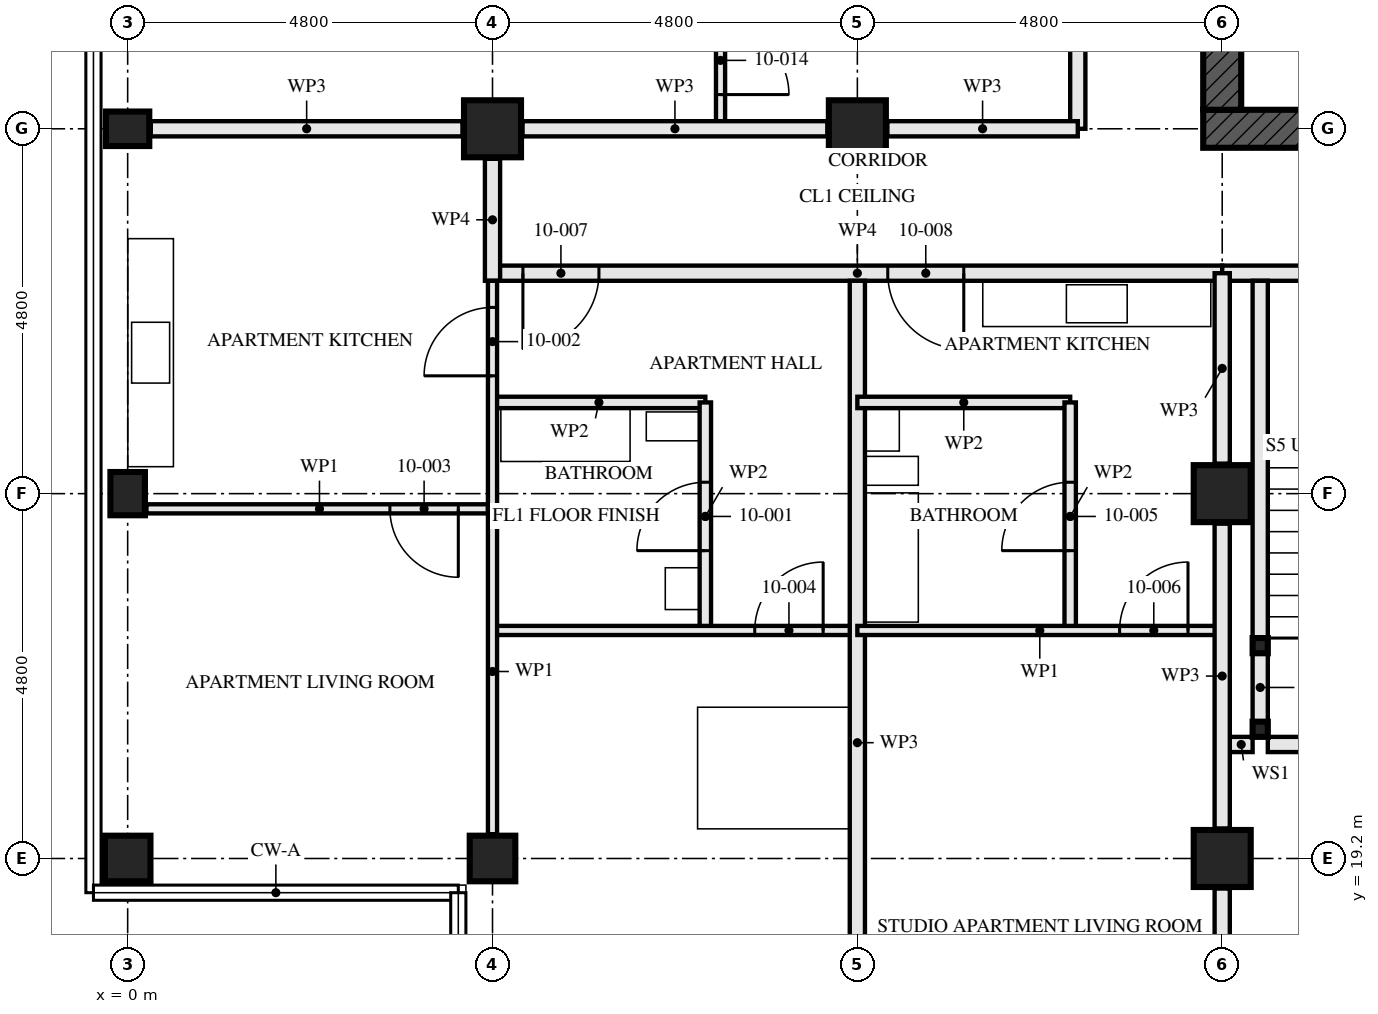
"""IFC4 building model, lengths in metres.
Left out: names, types, materials, properties, quantities, classifications, styles, units other than length and angle.
Written with IfcOpenShell. Run it as: python <this file> out.ifc"""

import sys

from ifc_helpers import new_model, si_unit, direction, frame, frame_2d, origin, origin_2d, place, context, subcontext, project, spatial, rectangle, hollow_rectangle, i_section, extrude, element, fill, save


model = new_model("IFC4")
c1 = context("Model", 3, precision=1e-05, world=origin(), true_north=direction((0.0, 1.0)))
c2 = subcontext(c1, "Body", "Model", "MODEL_VIEW")
j1 = project(units=[si_unit("LENGTHUNIT", "METRE"), si_unit("PLANEANGLEUNIT", "RADIAN")], contexts=[c1])
p1 = place(None, origin())
s1 = spatial("IfcSite", under=j1, at=p1, CompositionType="ELEMENT")
p2 = place(p1, origin())
s2 = spatial("IfcBuilding", under=s1, at=p2, CompositionType="ELEMENT")
p3 = place(p2, frame((0.0, 0.0, 41.0)))
s3 = spatial("IfcBuildingStorey", under=s2, at=p3, CompositionType="ELEMENT", Elevation=41.0)
p4 = place(p3, frame((0.0, 19.2, 0.0), z_axis=(0.0, 0.0, 1.0), x_axis=(0.0, 1.0, 0.0)))
e1 = element("IfcColumn", 1, at=p4, inside=s3, PredefinedType="COLUMN", context=c2, shape_type="SweptSolid", body=[
    extrude(hollow_rectangle(XDim=0.6, YDim=0.6, WallThickness=0.05, at=origin_2d()), origin(), (0.0, 0.0, 1.0), 3.5),
])
for number, where, z_axis, x_axis in (
    (2, (0.0, 24.0, 0.0), (0.0, 0.0, 1.0), (1.0, 0.0, 0.0)),
    (3, (0.0, 28.8, 0.0), (0.0, 0.0, 1.0), (0.0, 1.0, 0.0)),
):
    element("IfcColumn", number, at=place(p3, frame(where, z_axis=z_axis, x_axis=x_axis)), inside=s3, PredefinedType="COLUMN", context=c2, shape_type="SweptSolid", body=[
        extrude(i_section(OverallWidth=0.454, OverallDepth=0.569, WebThickness=0.078, FlangeThickness=0.125, FilletRadius=0.015, at=origin_2d()), origin(), (0.0, 0.0, 1.0), 3.5),
    ])
p5 = place(p3, frame((4.8, 19.2, 0.0), z_axis=(0.0, 0.0, 1.0), x_axis=(0.0, 1.0, 0.0)))
e4 = element("IfcColumn", 4, at=p5, inside=s3, PredefinedType="COLUMN", context=c2, shape_type="SweptSolid", body=[
    extrude(hollow_rectangle(XDim=0.6, YDim=0.6, WallThickness=0.05, at=origin_2d()), origin(), (0.0, 0.0, 1.0), 3.5),
])
for number, where, z_axis, x_axis in (
    (5, (4.8, 28.8, 0.0), (0.0, 0.0, 1.0), (0.0, 1.0, 0.0)),
    (6, (9.6, 28.8, 0.0), (0.0, 0.0, 1.0), (0.0, 1.0, 0.0)),
    (7, (14.4, 19.2, 0.0), (0.0, 0.0, 1.0), (1.0, 0.0, 0.0)),
    (8, (14.4, 24.0, 0.0), (0.0, 0.0, 1.0), (1.0, 0.0, 0.0)),
):
    element("IfcColumn", number, at=place(p3, frame(where, z_axis=z_axis, x_axis=x_axis)), inside=s3, PredefinedType="COLUMN", context=c2, shape_type="SweptSolid", body=[
        extrude(hollow_rectangle(XDim=0.75, YDim=0.75, WallThickness=0.08, at=origin_2d()), origin(), (0.0, 0.0, 1.0), 3.5),
    ])
p6 = place(p3, frame((14.15, 28.8, -0.17), z_axis=(0.0, 0.0, 1.0), x_axis=(1.0, 0.0, 0.0)))
e9 = element("IfcWall", 9, at=p6, inside=s3, PredefinedType="SHEAR", context=c2, shape_type="SweptSolid", body=[
    extrude(rectangle(XDim=14.9, YDim=0.5, at=frame_2d((7.45, 0.0))), origin(), (0.0, 0.0, 1.0), 3.5),
])
p7 = place(p6, frame((6.85, 0.0, 0.17)))
e10 = element("IfcOpeningElement", 10, at=p7, cuts=e9, PredefinedType="OPENING", context=c2, shape_type="SweptSolid", body=[
    extrude(rectangle(XDim=1.2, YDim=2.1, at=frame_2d((0.6, 1.05))), frame((0.0, 0.26, 0.0), z_axis=(0.0, -1.0, 0.0), x_axis=(1.0, 0.0, 0.0)), (0.0, 0.0, 1.0), 0.521),
])
p8 = place(p3, frame((14.4, 42.95, -0.17), z_axis=(0.0, 0.0, 1.0), x_axis=(0.0, -1.0, 0.0)))
e11 = element("IfcWall", 11, at=p8, inside=s3, PredefinedType="SHEAR", context=c2, shape_type="SweptSolid", body=[
    extrude(rectangle(XDim=13.9, YDim=0.5, at=frame_2d((6.95, 0.0))), origin(), (0.0, 0.0, 1.0), 3.5),
])
p9 = place(p8, frame((6.35, 0.0, 0.17)))
e12 = element("IfcOpeningElement", 12, at=p9, cuts=e11, PredefinedType="OPENING", context=c2, shape_type="SweptSolid", body=[
    extrude(rectangle(XDim=1.2, YDim=2.1, at=frame_2d((0.6, 1.05))), frame((0.0, 0.26, 0.0), z_axis=(0.0, -1.0, 0.0), x_axis=(1.0, 0.0, 0.0)), (0.0, 0.0, 1.0), 0.521),
])
for number, where, z_axis, x_axis in (
    (13, (14.9, 20.9, 0.0), (0.0, 0.0, 1.0), (1.0, 0.0, 0.0)),
    (14, (14.9, 22.0, 0.0), (0.0, 0.0, 1.0), (1.0, 0.0, 0.0)),
):
    element("IfcColumn", number, at=place(p3, frame(where, z_axis=z_axis, x_axis=x_axis)), inside=s3, PredefinedType="COLUMN", context=c2, shape_type="SweptSolid", body=[
        extrude(hollow_rectangle(XDim=0.2, YDim=0.2, WallThickness=0.008, at=origin_2d()), origin(), (0.0, 0.0, 1.0), 3.33),
    ])
p10 = place(p3, frame((7.6, 22.2, 0.0), z_axis=(0.0, 0.0, 1.0), x_axis=(0.0, 1.0, 0.0)))
e15 = element("IfcWall", 15, at=p10, inside=s3, PredefinedType="PARTITIONING", context=c2, shape_type="SweptSolid", body=[
    extrude(rectangle(XDim=3.0, YDim=0.15, at=frame_2d((1.5, 0.0))), origin(), (0.0, 0.0, 1.0), 2.55),
])
p11 = place(p10, frame((1.05, 0.0, 0.0)))
e16 = element("IfcOpeningElement", 16, at=p11, cuts=e15, PredefinedType="OPENING", context=c2, shape_type="SweptSolid", body=[
    extrude(rectangle(XDim=0.9, YDim=2.1, at=frame_2d((0.45, 1.05))), frame((0.0, 0.085, 0.0), z_axis=(0.0, -1.0, 0.0), x_axis=(1.0, 0.0, 0.0)), (0.0, 0.0, 1.0), 0.171),
])
p12 = place(p3, frame((4.8, 25.2, 0.0), z_axis=(0.0, 0.0, 1.0), x_axis=(1.0, 0.0, 0.0)))
e17 = element("IfcWall", 17, at=p12, inside=s3, PredefinedType="PARTITIONING", context=c2, shape_type="SweptSolid", body=[
    extrude(rectangle(XDim=2.8, YDim=0.15, at=frame_2d((1.4, 0.0))), origin(), (0.0, 0.0, 1.0), 3.33),
])
p13 = place(p3, frame((4.8, 23.8, 0.0), z_axis=(0.0, 0.0, 1.0), x_axis=(0.0, 1.0, 0.0)))
e18 = element("IfcWall", 18, at=p13, inside=s3, PredefinedType="PARTITIONING", context=c2, shape_type="SweptSolid", body=[
    extrude(rectangle(XDim=3.0, YDim=0.12, at=frame_2d((1.5, 0.0))), origin(), (0.0, 0.0, 1.0), 2.55),
])
p14 = place(p13, frame((1.75, 0.0, 0.0)))
e19 = element("IfcOpeningElement", 19, at=p14, cuts=e18, PredefinedType="OPENING", context=c2, shape_type="SweptSolid", body=[
    extrude(rectangle(XDim=0.9, YDim=2.1, at=frame_2d((0.45, 1.05))), frame((0.0, 0.071, 0.0), z_axis=(0.0, -1.0, 0.0), x_axis=(1.0, 0.0, 0.0)), (0.0, 0.0, 1.0), 0.141),
])
p15 = place(p3, frame((0.247, 23.8, 0.0), z_axis=(0.0, 0.0, 1.0), x_axis=(1.0, 0.0, 0.0)))
e20 = element("IfcWall", 20, at=p15, inside=s3, PredefinedType="PARTITIONING", context=c2, shape_type="SweptSolid", body=[
    extrude(rectangle(XDim=4.553, YDim=0.12, at=frame_2d((2.276, 0.0))), origin(), (0.0, 0.0, 1.0), 3.33),
])
p16 = place(p15, frame((3.203, 0.0, 0.0)))
e21 = element("IfcOpeningElement", 21, at=p16, cuts=e20, PredefinedType="OPENING", context=c2, shape_type="SweptSolid", body=[
    extrude(rectangle(XDim=0.9, YDim=2.1, at=frame_2d((0.45, 1.05))), frame((0.0, 0.071, 0.0), z_axis=(0.0, -1.0, 0.0), x_axis=(1.0, 0.0, 0.0)), (0.0, 0.0, 1.0), 0.141),
])
p17 = place(p3, frame((4.8, 22.2, 0.0), z_axis=(0.0, 0.0, 1.0), x_axis=(1.0, 0.0, 0.0)))
e22 = element("IfcWall", 22, at=p17, inside=s3, PredefinedType="PARTITIONING", context=c2, shape_type="SweptSolid", body=[
    extrude(rectangle(XDim=4.8, YDim=0.12, at=frame_2d((2.4, 0.0))), origin(), (0.0, 0.0, 1.0), 3.33),
])
p18 = place(p17, frame((3.45, 0.0, 0.0)))
e23 = element("IfcOpeningElement", 23, at=p18, cuts=e22, PredefinedType="OPENING", context=c2, shape_type="SweptSolid", body=[
    extrude(rectangle(XDim=0.9, YDim=2.1, at=frame_2d((0.45, 1.05))), frame((0.0, 0.071, 0.0), z_axis=(0.0, -1.0, 0.0), x_axis=(1.0, 0.0, 0.0)), (0.0, 0.0, 1.0), 0.141),
])
p19 = place(p3, frame((4.8, 19.52, 0.0), z_axis=(0.0, 0.0, 1.0), x_axis=(0.0, 1.0, 0.0)))
e24 = element("IfcWall", 24, at=p19, inside=s3, PredefinedType="PARTITIONING", context=c2, shape_type="SweptSolid", body=[
    extrude(rectangle(XDim=4.28, YDim=0.12, at=frame_2d((2.14, 0.0))), origin(), (0.0, 0.0, 1.0), 3.33),
])
p20 = place(p3, frame((9.6, 14.647, 0.0), z_axis=(0.0, 0.0, 1.0), x_axis=(0.0, 1.0, 0.0)))
e25 = element("IfcWall", 25, at=p20, inside=s3, PredefinedType="PARTITIONING", context=c2, shape_type="SweptSolid", body=[
    extrude(rectangle(XDim=12.153, YDim=0.2, at=frame_2d((6.077, 0.0))), origin(), (0.0, 0.0, 1.0), 2.55),
])
p21 = place(p3, frame((12.4, 22.2, 0.0), z_axis=(0.0, 0.0, 1.0), x_axis=(0.0, 1.0, 0.0)))
e26 = element("IfcWall", 26, at=p21, inside=s3, PredefinedType="PARTITIONING", context=c2, shape_type="SweptSolid", body=[
    extrude(rectangle(XDim=3.0, YDim=0.15, at=frame_2d((1.5, 0.0))), origin(), (0.0, 0.0, 1.0), 2.55),
])
p22 = place(p21, frame((1.05, 0.0, 0.0)))
e27 = element("IfcOpeningElement", 27, at=p22, cuts=e26, PredefinedType="OPENING", context=c2, shape_type="SweptSolid", body=[
    extrude(rectangle(XDim=0.9, YDim=2.1, at=frame_2d((0.45, 1.05))), frame((0.0, 0.085, 0.0), z_axis=(0.0, -1.0, 0.0), x_axis=(1.0, 0.0, 0.0)), (0.0, 0.0, 1.0), 0.171),
])
p23 = place(p3, frame((9.6, 25.2, 0.0), z_axis=(0.0, 0.0, 1.0), x_axis=(1.0, 0.0, 0.0)))
e28 = element("IfcWall", 28, at=p23, inside=s3, PredefinedType="PARTITIONING", context=c2, shape_type="SweptSolid", body=[
    extrude(rectangle(XDim=2.8, YDim=0.15, at=frame_2d((1.4, 0.0))), origin(), (0.0, 0.0, 1.0), 3.33),
])
p24 = place(p3, frame((9.6, 22.2, 0.0), z_axis=(0.0, 0.0, 1.0), x_axis=(1.0, 0.0, 0.0)))
e29 = element("IfcWall", 29, at=p24, inside=s3, PredefinedType="PARTITIONING", context=c2, shape_type="SweptSolid", body=[
    extrude(rectangle(XDim=4.8, YDim=0.12, at=frame_2d((2.4, 0.0))), origin(), (0.0, 0.0, 1.0), 3.33),
])
p25 = place(p24, frame((3.45, 0.0, 0.0)))
e30 = element("IfcOpeningElement", 30, at=p25, cuts=e29, PredefinedType="OPENING", context=c2, shape_type="SweptSolid", body=[
    extrude(rectangle(XDim=0.9, YDim=2.1, at=frame_2d((0.45, 1.05))), frame((0.0, 0.071, 0.0), z_axis=(0.0, -1.0, 0.0), x_axis=(1.0, 0.0, 0.0)), (0.0, 0.0, 1.0), 0.141),
])
p26 = place(p3, frame((4.8, 26.9, 0.0), z_axis=(0.0, 0.0, 1.0), x_axis=(1.0, 0.0, 0.0)))
e31 = element("IfcWall", 31, at=p26, inside=s3, PredefinedType="PARTITIONING", context=c2, shape_type="SweptSolid", body=[
    extrude(rectangle(XDim=9.6, YDim=0.2, at=frame_2d((4.8, 0.0))), origin(), (0.0, 0.0, 1.0), 3.33),
])
p27 = place(p26, frame((0.4, 0.0, 0.0)))
e32 = element("IfcOpeningElement", 32, at=p27, cuts=e31, PredefinedType="OPENING", context=c2, shape_type="SweptSolid", body=[
    extrude(rectangle(XDim=1.0, YDim=2.1, at=frame_2d((0.5, 1.05))), frame((0.0, 0.111, 0.0), z_axis=(0.0, -1.0, 0.0), x_axis=(1.0, 0.0, 0.0)), (0.0, 0.0, 1.0), 0.221),
])
p28 = place(p26, frame((5.2, 0.0, 0.0)))
e33 = element("IfcOpeningElement", 33, at=p28, cuts=e31, PredefinedType="OPENING", context=c2, shape_type="SweptSolid", body=[
    extrude(rectangle(XDim=1.0, YDim=2.1, at=frame_2d((0.5, 1.05))), frame((0.0, 0.111, 0.0), z_axis=(0.0, -1.0, 0.0), x_axis=(1.0, 0.0, 0.0)), (0.0, 0.0, 1.0), 0.221),
])
p29 = place(p3, frame((4.8, 26.8, 0.0), z_axis=(0.0, 0.0, 1.0), x_axis=(0.0, 1.0, 0.0)))
e34 = element("IfcWall", 34, at=p29, inside=s3, PredefinedType="PARTITIONING", context=c2, shape_type="SweptSolid", body=[
    extrude(rectangle(XDim=1.605, YDim=0.2, at=frame_2d((0.802, 0.0))), origin(), (0.0, 0.0, 1.0), 3.33),
])
p30 = place(p3, frame((7.8, 33.6, 0.0), z_axis=(0.0, 0.0, 1.0), x_axis=(0.0, -1.0, 0.0)))
e35 = element("IfcWall", 35, at=p30, inside=s3, PredefinedType="PARTITIONING", context=c2, shape_type="SweptSolid", body=[
    extrude(rectangle(XDim=4.8, YDim=0.12, at=frame_2d((2.4, 0.0))), origin(), (0.0, 0.0, 1.0), 3.33),
])
p31 = place(p30, frame((3.45, 0.0, 0.0)))
e36 = element("IfcOpeningElement", 36, at=p31, cuts=e35, PredefinedType="OPENING", context=c2, shape_type="SweptSolid", body=[
    extrude(rectangle(XDim=0.9, YDim=2.1, at=frame_2d((0.45, 1.05))), frame((0.0, 0.071, 0.0), z_axis=(0.0, -1.0, 0.0), x_axis=(1.0, 0.0, 0.0)), (0.0, 0.0, 1.0), 0.141),
])
p32 = place(p3, frame((12.5, 43.2, 0.0), z_axis=(0.0, 0.0, 1.0), x_axis=(0.0, -1.0, 0.0)))
e37 = element("IfcWall", 37, at=p32, inside=s3, PredefinedType="PARTITIONING", context=c2, shape_type="SweptSolid", body=[
    extrude(rectangle(XDim=14.4, YDim=0.2, at=frame_2d((7.2, 0.0))), origin(), (0.0, 0.0, 1.0), 2.55),
])
p33 = place(p32, frame((1.4, 0.0, 0.0)))
e38 = element("IfcOpeningElement", 38, at=p33, cuts=e37, PredefinedType="OPENING", context=c2, shape_type="SweptSolid", body=[
    extrude(rectangle(XDim=1.0, YDim=2.1, at=frame_2d((0.5, 1.05))), frame((0.0, 0.111, 0.0), z_axis=(0.0, -1.0, 0.0), x_axis=(1.0, 0.0, 0.0)), (0.0, 0.0, 1.0), 0.221),
])
p34 = place(p32, frame((10.0, 0.0, 0.0)))
e39 = element("IfcOpeningElement", 39, at=p34, cuts=e37, PredefinedType="OPENING", context=c2, shape_type="SweptSolid", body=[
    extrude(rectangle(XDim=1.0, YDim=2.1, at=frame_2d((0.5, 1.05))), frame((0.0, 0.111, 0.0), z_axis=(0.0, -1.0, 0.0), x_axis=(1.0, 0.0, 0.0)), (0.0, 0.0, 1.0), 0.221),
])
p35 = place(p3, frame((14.9, 21.0, 0.0), z_axis=(0.0, 0.0, 1.0), x_axis=(0.0, 1.0, 0.0)))
e40 = element("IfcWall", 40, at=p35, inside=s3, PredefinedType="SOLIDWALL", context=c2, shape_type="SweptSolid", body=[
    extrude(rectangle(XDim=0.9, YDim=0.2, at=frame_2d((0.45, 0.0))), origin(), (0.0, 0.0, 1.0), 2.99),
])
p36 = place(p3, frame((14.9, 22.1, 0.0), z_axis=(0.0, 0.0, 1.0), x_axis=(0.0, 1.0, 0.0)))
e41 = element("IfcWall", 41, at=p36, inside=s3, PredefinedType="SOLIDWALL", context=c2, shape_type="SweptSolid", body=[
    extrude(rectangle(XDim=4.7, YDim=0.2, at=frame_2d((2.35, 0.0))), origin(), (0.0, 0.0, 1.0), 2.99),
])
p37 = place(p3, frame((14.5, 20.7, 0.0), z_axis=(0.0, 0.0, 1.0), x_axis=(1.0, 0.0, 0.0)))
e42 = element("IfcWall", 42, at=p37, inside=s3, PredefinedType="SOLIDWALL", context=c2, shape_type="SweptSolid", body=[
    extrude(rectangle(XDim=0.3, YDim=0.2, at=frame_2d((0.15, 0.0))), origin(), (0.0, 0.0, 1.0), 3.33),
])
p38 = place(p3, frame((15.0, 20.7, 0.0), z_axis=(0.0, 0.0, 1.0), x_axis=(1.0, 0.0, 0.0)))
e43 = element("IfcWall", 43, at=p38, inside=s3, PredefinedType="SOLIDWALL", context=c2, shape_type="SweptSolid", body=[
    extrude(rectangle(XDim=2.6, YDim=0.2, at=frame_2d((1.3, 0.0))), origin(), (0.0, 0.0, 1.0), 3.33),
])
p39 = place(p3, frame((14.4, 26.9, 0.0), z_axis=(0.0, 0.0, 1.0), x_axis=(1.0, 0.0, 0.0)))
e44 = element("IfcWall", 44, at=p39, inside=s3, PredefinedType="SOLIDWALL", context=c2, shape_type="SweptSolid", body=[
    extrude(rectangle(XDim=3.4, YDim=0.2, at=frame_2d((1.7, 0.0))), origin(), (0.0, 0.0, 1.0), 3.33),
])
p40 = place(p39, frame((1.4, 0.0, 0.0)))
e45 = element("IfcOpeningElement", 45, at=p40, cuts=e44, PredefinedType="OPENING", context=c2, shape_type="SweptSolid", body=[
    extrude(rectangle(XDim=1.0, YDim=2.1, at=frame_2d((0.5, 1.05))), frame((0.0, 0.111, 0.0), z_axis=(0.0, -1.0, 0.0), x_axis=(1.0, 0.0, 0.0)), (0.0, 0.0, 1.0), 0.221),
])
p41 = place(p3, frame((12.5, 28.8, 0.0), z_axis=(0.0, 0.0, 1.0), x_axis=(-1.0, 0.0, 0.0)))
e46 = element("IfcWall", 46, at=p41, inside=s3, PredefinedType="PARTITIONING", context=c2, shape_type="SweptSolid", body=[
    extrude(rectangle(XDim=2.505, YDim=0.2, at=frame_2d((1.252, 0.0))), origin(), (0.0, 0.0, 1.0), 2.32),
])
p42 = place(p3, frame((9.205, 28.8, 0.0), z_axis=(0.0, 0.0, 1.0), x_axis=(-1.0, 0.0, 0.0)))
e47 = element("IfcWall", 47, at=p42, inside=s3, PredefinedType="PARTITIONING", context=c2, shape_type="SweptSolid", body=[
    extrude(rectangle(XDim=4.01, YDim=0.2, at=frame_2d((2.005, 0.0))), origin(), (0.0, 0.0, 1.0), 2.32),
])
p43 = place(p3, frame((4.405, 28.8, 0.0), z_axis=(0.0, 0.0, 1.0), x_axis=(-1.0, 0.0, 0.0)))
e48 = element("IfcWall", 48, at=p43, inside=s3, PredefinedType="PARTITIONING", context=c2, shape_type="SweptSolid", body=[
    extrude(rectangle(XDim=4.101, YDim=0.2, at=frame_2d((2.05, 0.0))), origin(), (0.0, 0.0, 1.0), 2.32),
])
p44 = place(p3, frame((14.4, 14.647, 0.0), z_axis=(0.0, 0.0, 1.0), x_axis=(0.0, 1.0, 0.0)))
e49 = element("IfcWall", 49, at=p44, inside=s3, PredefinedType="PARTITIONING", context=c2, shape_type="SweptSolid", body=[
    extrude(rectangle(XDim=4.158, YDim=0.2, at=frame_2d((2.079, 0.0))), origin(), (0.0, 0.0, 1.0), 2.32),
])
p45 = place(p3, frame((14.4, 19.595, 0.0), z_axis=(0.0, 0.0, 1.0), x_axis=(0.0, 1.0, 0.0)))
e50 = element("IfcWall", 50, at=p45, inside=s3, PredefinedType="PARTITIONING", context=c2, shape_type="SweptSolid", body=[
    extrude(rectangle(XDim=4.01, YDim=0.2, at=frame_2d((2.005, 0.0))), origin(), (0.0, 0.0, 1.0), 2.32),
])
p46 = place(p3, frame((14.4, 24.395, 0.0), z_axis=(0.0, 0.0, 1.0), x_axis=(0.0, 1.0, 0.0)))
e51 = element("IfcWall", 51, at=p46, inside=s3, PredefinedType="PARTITIONING", context=c2, shape_type="SweptSolid", body=[
    extrude(rectangle(XDim=2.505, YDim=0.2, at=frame_2d((1.252, 0.0))), origin(), (0.0, 0.0, 1.0), 2.32),
])
p47 = place(p11, origin())
e52 = element("IfcDoor", 52, at=p47, inside=s3, OperationType="SINGLE_SWING_RIGHT", PredefinedType="DOOR", context=c2, shape_type="SweptSolid", body=[
    extrude(rectangle(XDim=0.9, YDim=2.1, at=frame_2d((0.45, 1.05))), frame((0.0, 0.022, 0.0), z_axis=(0.0, -1.0, 0.0), x_axis=(1.0, 0.0, 0.0)), (0.0, 0.0, 1.0), 0.044),
])
fill(e16, e52)
p48 = place(p14, origin())
e53 = element("IfcDoor", 53, at=p48, inside=s3, OperationType="SINGLE_SWING_RIGHT", PredefinedType="DOOR", context=c2, shape_type="SweptSolid", body=[
    extrude(rectangle(XDim=0.9, YDim=2.1, at=frame_2d((0.45, 1.05))), frame((0.0, 0.022, 0.0), z_axis=(0.0, -1.0, 0.0), x_axis=(1.0, 0.0, 0.0)), (0.0, 0.0, 1.0), 0.044),
])
fill(e19, e53)
p49 = place(p16, frame((0.9, 0.0, 0.0), z_axis=(0.0, 0.0, 1.0), x_axis=(-1.0, 0.0, 0.0)))
e54 = element("IfcDoor", 54, at=p49, inside=s3, OperationType="SINGLE_SWING_RIGHT", PredefinedType="DOOR", context=c2, shape_type="SweptSolid", body=[
    extrude(rectangle(XDim=0.9, YDim=2.1, at=frame_2d((0.45, 1.05))), frame((0.0, 0.022, 0.0), z_axis=(0.0, -1.0, 0.0), x_axis=(1.0, 0.0, 0.0)), (0.0, 0.0, 1.0), 0.044),
])
fill(e21, e54)
p50 = place(p18, origin())
e55 = element("IfcDoor", 55, at=p50, inside=s3, OperationType="SINGLE_SWING_LEFT", PredefinedType="DOOR", context=c2, shape_type="SweptSolid", body=[
    extrude(rectangle(XDim=0.9, YDim=2.1, at=frame_2d((0.45, 1.05))), frame((0.0, 0.022, 0.0), z_axis=(0.0, -1.0, 0.0), x_axis=(1.0, 0.0, 0.0)), (0.0, 0.0, 1.0), 0.044),
])
fill(e23, e55)
p51 = place(p22, origin())
e56 = element("IfcDoor", 56, at=p51, inside=s3, OperationType="SINGLE_SWING_RIGHT", PredefinedType="DOOR", context=c2, shape_type="SweptSolid", body=[
    extrude(rectangle(XDim=0.9, YDim=2.1, at=frame_2d((0.45, 1.05))), frame((0.0, 0.022, 0.0), z_axis=(0.0, -1.0, 0.0), x_axis=(1.0, 0.0, 0.0)), (0.0, 0.0, 1.0), 0.044),
])
fill(e27, e56)
p52 = place(p25, origin())
e57 = element("IfcDoor", 57, at=p52, inside=s3, OperationType="SINGLE_SWING_LEFT", PredefinedType="DOOR", context=c2, shape_type="SweptSolid", body=[
    extrude(rectangle(XDim=0.9, YDim=2.1, at=frame_2d((0.45, 1.05))), frame((0.0, 0.022, 0.0), z_axis=(0.0, -1.0, 0.0), x_axis=(1.0, 0.0, 0.0)), (0.0, 0.0, 1.0), 0.044),
])
fill(e30, e57)
p53 = place(p27, frame((1.0, 0.0, 0.0), z_axis=(0.0, 0.0, 1.0), x_axis=(-1.0, 0.0, 0.0)))
e58 = element("IfcDoor", 58, at=p53, inside=s3, OperationType="SINGLE_SWING_LEFT", PredefinedType="DOOR", context=c2, shape_type="SweptSolid", body=[
    extrude(rectangle(XDim=1.0, YDim=2.1, at=frame_2d((0.5, 1.05))), frame((0.0, 0.027, 0.0), z_axis=(0.0, -1.0, 0.0), x_axis=(1.0, 0.0, 0.0)), (0.0, 0.0, 1.0), 0.054),
])
fill(e32, e58)
p54 = place(p28, frame((1.0, 0.0, 0.0), z_axis=(0.0, 0.0, 1.0), x_axis=(-1.0, 0.0, 0.0)))
e59 = element("IfcDoor", 59, at=p54, inside=s3, OperationType="SINGLE_SWING_RIGHT", PredefinedType="DOOR", context=c2, shape_type="SweptSolid", body=[
    extrude(rectangle(XDim=1.0, YDim=2.1, at=frame_2d((0.5, 1.05))), frame((0.0, 0.027, 0.0), z_axis=(0.0, -1.0, 0.0), x_axis=(1.0, 0.0, 0.0)), (0.0, 0.0, 1.0), 0.054),
])
fill(e33, e59)
p55 = place(p31, origin())
e60 = element("IfcDoor", 60, at=p55, inside=s3, OperationType="SINGLE_SWING_LEFT", PredefinedType="DOOR", context=c2, shape_type="SweptSolid", body=[
    extrude(rectangle(XDim=0.9, YDim=2.1, at=frame_2d((0.45, 1.05))), frame((0.0, 0.022, 0.0), z_axis=(0.0, -1.0, 0.0), x_axis=(1.0, 0.0, 0.0)), (0.0, 0.0, 1.0), 0.044),
])
fill(e36, e60)
save(model, sys.argv[1])
